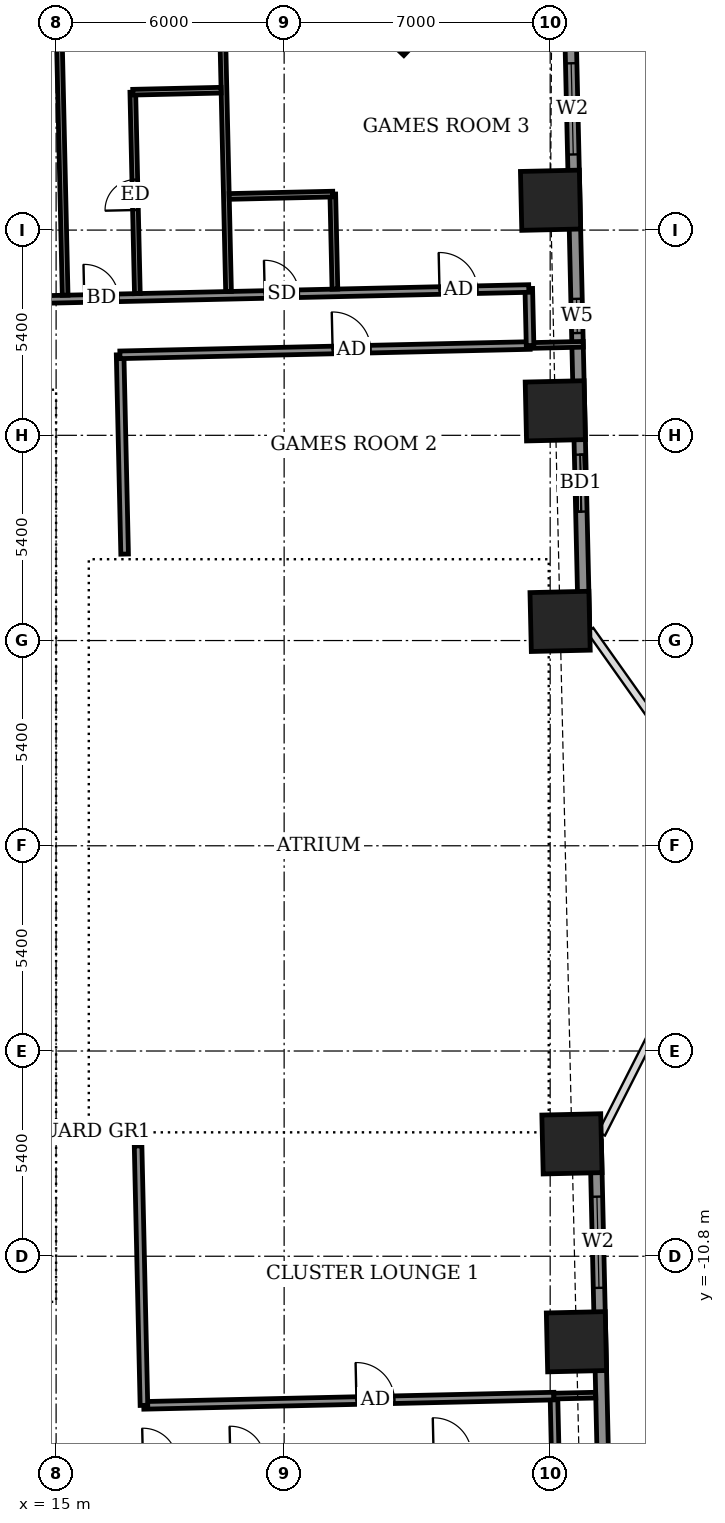
"""IFC4 building model, lengths in metres.
Left out: names, types, materials, properties, quantities, classifications, styles, units other than length and angle.
Written with IfcOpenShell. Run it as: python <this file> out.ifc"""

import sys

from ifc_helpers import new_model, si_unit, direction, frame, frame_2d, origin, origin_2d, place, context, subcontext, project, spatial, rectangle, extrude, element, fill, save


model = new_model("IFC4")
c1 = context("Model", 3, precision=1e-05, world=origin(), true_north=direction((0.0, 1.0)))
c2 = subcontext(c1, "Body", "Model", "MODEL_VIEW")
j1 = project(units=[si_unit("LENGTHUNIT", "METRE"), si_unit("PLANEANGLEUNIT", "RADIAN")], contexts=[c1])
p1 = place(None, origin())
s1 = spatial("IfcSite", under=j1, at=p1, CompositionType="ELEMENT")
p2 = place(p1, origin())
s2 = spatial("IfcBuilding", under=s1, at=p2, CompositionType="ELEMENT")
p3 = place(p2, frame((0.0, 0.0, 34.1)))
s3 = spatial("IfcBuildingStorey", under=s2, at=p3, CompositionType="ELEMENT", Elevation=34.1)
for number, where, z_axis, x_axis in (
    (1, (28.691, -13.05, -0.55), (0.0, 0.0, 1.0), (-0.023, 1.0, 0.0)),
    (2, (28.573, -7.843, -0.55), (0.0, 0.0, 1.0), (-0.023, 1.0, 0.0)),
    (3, (28.261, 5.904, -0.55), (0.0, 0.0, 1.0), (-0.023, 1.0, 0.0)),
    (4, (28.135, 11.444, -0.55), (0.0, 0.0, 1.0), (-0.023, 1.0, 0.0)),
    (5, (28.01, 16.985, -0.55), (0.0, 0.0, 1.0), (-0.023, 1.0, 0.0)),
    (6, (24.125, 21.892, -0.55), (0.0, 0.0, 1.0), (-0.723, 0.691, 0.0)),
):
    element("IfcColumn", number, at=place(p3, frame(where, z_axis=z_axis, x_axis=x_axis)), inside=s3, PredefinedType="COLUMN", context=c2, shape_type="SweptSolid", body=[
        extrude(rectangle(XDim=1.55, YDim=1.55, at=origin_2d()), origin(), (0.0, 0.0, 1.0), 3.6),
    ])
p4 = place(p3, frame((29.549, -23.299, 0.0), z_axis=(0.0, 0.0, 1.0), x_axis=(-0.022670336976, 0.999742994885, 0.0)))
e7 = element("IfcWall", 7, at=p4, inside=s3, PredefinedType="SOLIDWALL", context=c2, shape_type="SweptSolid", body=[
    extrude(rectangle(XDim=15.529, YDim=0.3, at=frame_2d((7.765, 0.0))), origin(), (0.0, 0.0, 1.0), 3.05),
])
p5 = place(p4, frame((2.133, 0.0, 0.0)))
e8 = element("IfcOpeningElement", 8, at=p5, cuts=e7, PredefinedType="OPENING", context=c2, shape_type="SweptSolid", body=[
    extrude(rectangle(XDim=1.5, YDim=2.4, at=frame_2d((0.75, 1.2))), frame((0.0, 0.16, 0.0), z_axis=(0.0, -1.0, 0.0), x_axis=(1.0, 0.0, 0.0)), (0.0, 0.0, 1.0), 0.32),
])
p6 = place(p4, frame((11.67, 0.0, 0.9)))
e9 = element("IfcOpeningElement", 9, at=p6, cuts=e7, PredefinedType="OPENING", context=c2, shape_type="SweptSolid", body=[
    extrude(rectangle(XDim=2.4, YDim=1.5, at=frame_2d((1.2, 0.75))), frame((0.0, 0.16, 0.0), z_axis=(0.0, -1.0, 0.0), x_axis=(1.0, 0.0, 0.0)), (0.0, 0.0, 1.0), 0.32),
])
p7 = place(p3, frame((28.887, 5.864, 0.0), z_axis=(0.0, 0.0, 1.0), x_axis=(-0.022687182773, 0.999742612745, 0.0)))
e10 = element("IfcWall", 10, at=p7, inside=s3, PredefinedType="SOLIDWALL", context=c2, shape_type="SweptSolid", body=[
    extrude(rectangle(XDim=16.529, YDim=0.3, at=frame_2d((8.265, 0.0))), origin(), (0.0, 0.0, 1.0), 3.05),
])
p8 = place(p7, frame((2.929, 0.0, 0.0)))
e11 = element("IfcOpeningElement", 11, at=p8, cuts=e10, PredefinedType="OPENING", context=c2, shape_type="SweptSolid", body=[
    extrude(rectangle(XDim=1.5, YDim=2.4, at=frame_2d((0.75, 1.2))), frame((0.0, 0.16, 0.0), z_axis=(0.0, -1.0, 0.0), x_axis=(1.0, 0.0, 0.0)), (0.0, 0.0, 1.0), 0.32),
])
p9 = place(p7, frame((7.629, 0.0, 0.9)))
e12 = element("IfcOpeningElement", 12, at=p9, cuts=e10, PredefinedType="OPENING", context=c2, shape_type="SweptSolid", body=[
    extrude(rectangle(XDim=0.9, YDim=1.5, at=frame_2d((0.45, 0.75))), frame((0.0, 0.16, 0.0), z_axis=(0.0, -1.0, 0.0), x_axis=(1.0, 0.0, 0.0)), (0.0, 0.0, 1.0), 0.32),
])
p10 = place(p7, frame((12.329, 0.0, 0.9)))
e13 = element("IfcOpeningElement", 13, at=p10, cuts=e10, PredefinedType="OPENING", context=c2, shape_type="SweptSolid", body=[
    extrude(rectangle(XDim=2.4, YDim=1.5, at=frame_2d((1.2, 0.75))), frame((0.0, 0.16, 0.0), z_axis=(0.0, -1.0, 0.0), x_axis=(1.0, 0.0, 0.0)), (0.0, 0.0, 1.0), 0.32),
])
p11 = place(p3, frame((30.832, -15.918, 0.0), z_axis=(0.0, 0.0, 1.0), x_axis=(-0.022828630714, 0.999739392852, 0.0)))
e14 = element("IfcWall", 14, at=p11, inside=s3, PredefinedType="USERDEFINED", context=c2, shape_type="SweptSolid", body=[
    extrude(rectangle(XDim=6.0, YDim=0.55, at=frame_2d((3.0, 0.0))), origin(), (0.0, 0.0, 1.0), 0.8),
])
p12 = place(p3, frame((30.33, 6.201, 0.0), z_axis=(0.0, 0.0, 1.0), x_axis=(-0.022744303924, 0.999741314861, 0.0)))
e15 = element("IfcWall", 15, at=p12, inside=s3, PredefinedType="USERDEFINED", context=c2, shape_type="SweptSolid", body=[
    extrude(rectangle(XDim=3.875, YDim=0.55, at=frame_2d((1.938, 0.0))), origin(), (0.0, 0.0, 1.0), 0.8),
])
p13 = place(p3, frame((28.133, -15.979, 0.0), z_axis=(0.0, 0.0, 1.0), x_axis=(-0.022632637625, 0.99974384905, 0.0)))
e16 = element("IfcWall", 16, at=p13, inside=s3, PredefinedType="PARTITIONING", context=c2, shape_type="SweptSolid", body=[
    extrude(rectangle(XDim=1.5, YDim=0.2, at=frame_2d((0.75, 0.0))), origin(), (0.0, 0.0, 1.0), 3.05),
])
p14 = place(p3, frame((17.306, -14.724, 0.0), z_axis=(0.0, 0.0, 1.0), x_axis=(0.999744269809, 0.022614043969, 0.0)))
e17 = element("IfcWall", 17, at=p14, inside=s3, PredefinedType="PARTITIONING", context=c2, shape_type="SweptSolid", body=[
    extrude(rectangle(XDim=10.796, YDim=0.2, at=frame_2d((5.398, 0.0))), origin(), (0.0, 0.0, 1.0), 3.05),
])
p15 = place(p14, frame((5.598, 0.0, 0.0)))
e18 = element("IfcOpeningElement", 18, at=p15, cuts=e17, PredefinedType="OPENING", context=c2, shape_type="SweptSolid", body=[
    extrude(rectangle(XDim=1.0, YDim=2.1, at=frame_2d((0.5, 1.05))), frame((0.0, 0.11, 0.0), z_axis=(0.0, -1.0, 0.0), x_axis=(1.0, 0.0, 0.0)), (0.0, 0.0, 1.0), 0.22),
])
p16 = place(p3, frame((17.311, -14.724, 0.0), z_axis=(0.0, 0.0, 1.0), x_axis=(-0.022562209343, 0.999745440955, 0.0)))
e19 = element("IfcWall", 19, at=p16, inside=s3, PredefinedType="PARTITIONING", context=c2, shape_type="SweptSolid", body=[
    extrude(rectangle(XDim=6.828, YDim=0.2, at=frame_2d((3.414, 0.0))), origin(), (0.0, 0.0, 1.0), 3.05),
])
p17 = place(p3, frame((28.095, -14.48, 0.0), z_axis=(0.0, 0.0, 1.0), x_axis=(0.999745251335, 0.022570609924, 0.0)))
e20 = element("IfcWall", 20, at=p17, inside=s3, PredefinedType="PARTITIONING", context=c2, shape_type="SweptSolid", body=[
    extrude(rectangle(XDim=1.103, YDim=0.15, at=frame_2d((0.552, 0.0))), origin(), (0.0, 0.0, 1.0), 2.55),
])
p18 = place(p3, frame((16.803, 7.675, 0.0), z_axis=(0.0, 0.0, 1.0), x_axis=(-0.022667483124, 0.999743059595, 0.0)))
e21 = element("IfcWall", 21, at=p18, inside=s3, PredefinedType="PARTITIONING", context=c2, shape_type="SweptSolid", body=[
    extrude(rectangle(XDim=5.245, YDim=0.2, at=frame_2d((2.623, 0.0))), origin(), (0.0, 0.0, 1.0), 3.05),
])
p19 = place(p3, frame((16.679, 12.918, 0.0), z_axis=(0.0, 0.0, 1.0), x_axis=(0.999742162372, 0.022707020428, 0.0)))
e22 = element("IfcWall", 22, at=p19, inside=s3, PredefinedType="PARTITIONING", context=c2, shape_type="SweptSolid", body=[
    extrude(rectangle(XDim=10.795, YDim=0.2, at=frame_2d((5.397, 0.0))), origin(), (0.0, 0.0, 1.0), 3.05),
])
p20 = place(p19, frame((5.598, 0.0, 0.0)))
e23 = element("IfcOpeningElement", 23, at=p20, cuts=e22, PredefinedType="OPENING", context=c2, shape_type="SweptSolid", body=[
    extrude(rectangle(XDim=1.0, YDim=2.1, at=frame_2d((0.5, 1.05))), frame((0.0, 0.11, 0.0), z_axis=(0.0, -1.0, 0.0), x_axis=(1.0, 0.0, 0.0)), (0.0, 0.0, 1.0), 0.22),
])
p21 = place(p3, frame((27.471, 13.163, 0.0), z_axis=(0.0, 0.0, 1.0), x_axis=(0.999739219063, 0.022836240226, 0.0)))
e24 = element("IfcWall", 24, at=p21, inside=s3, PredefinedType="PARTITIONING", context=c2, shape_type="SweptSolid", body=[
    extrude(rectangle(XDim=1.4, YDim=0.15, at=frame_2d((0.7, 0.0))), origin(), (0.0, 0.0, 1.0), 2.55),
])
p22 = place(p3, frame((27.471, 13.163, 0.0), z_axis=(0.0, 0.0, 1.0), x_axis=(-0.022617910375, 0.999744182344, 0.0)))
e25 = element("IfcWall", 25, at=p22, inside=s3, PredefinedType="PARTITIONING", context=c2, shape_type="SweptSolid", body=[
    extrude(rectangle(XDim=1.5, YDim=0.2, at=frame_2d((0.75, 0.0))), origin(), (0.0, 0.0, 1.0), 3.05),
])
p23 = place(p3, frame((-31.347, 13.329, 0.0), z_axis=(0.0, 0.0, 1.0), x_axis=(0.999742613079, 0.022687168058, 0.0)))
e26 = element("IfcWall", 26, at=p23, inside=s3, PredefinedType="PARTITIONING", context=c2, shape_type="SweptSolid", body=[
    extrude(rectangle(XDim=58.799, YDim=0.2, at=frame_2d((29.399, 0.0))), origin(), (0.0, 0.0, 1.0), 3.05),
])
p24 = place(p23, frame((56.45, 0.0, 0.0)))
e27 = element("IfcOpeningElement", 27, at=p24, cuts=e26, PredefinedType="OPENING", context=c2, shape_type="SweptSolid", body=[
    extrude(rectangle(XDim=1.0, YDim=2.1, at=frame_2d((0.5, 1.05))), frame((0.0, 0.11, 0.0), z_axis=(0.0, -1.0, 0.0), x_axis=(1.0, 0.0, 0.0)), (0.0, 0.0, 1.0), 0.22),
])
p25 = place(p23, frame((51.85, 0.0, 0.0)))
e28 = element("IfcOpeningElement", 28, at=p25, cuts=e26, PredefinedType="OPENING", context=c2, shape_type="SweptSolid", body=[
    extrude(rectangle(XDim=0.9, YDim=2.1, at=frame_2d((0.45, 1.05))), frame((0.0, 0.11, 0.0), z_axis=(0.0, -1.0, 0.0), x_axis=(1.0, 0.0, 0.0)), (0.0, 0.0, 1.0), 0.22),
])
p26 = place(p23, frame((47.1, 0.0, 0.0)))
e29 = element("IfcOpeningElement", 29, at=p26, cuts=e26, PredefinedType="OPENING", context=c2, shape_type="SweptSolid", body=[
    extrude(rectangle(XDim=0.9, YDim=2.1, at=frame_2d((0.45, 1.05))), frame((0.0, 0.11, 0.0), z_axis=(0.0, -1.0, 0.0), x_axis=(1.0, 0.0, 0.0)), (0.0, 0.0, 1.0), 0.22),
])
p27 = place(p23, frame((45.225, 0.0, 0.0)))
e30 = element("IfcOpeningElement", 30, at=p27, cuts=e26, PredefinedType="OPENING", context=c2, shape_type="SweptSolid", body=[
    extrude(rectangle(XDim=0.9, YDim=2.1, at=frame_2d((0.45, 1.05))), frame((0.0, 0.11, 0.0), z_axis=(0.0, -1.0, 0.0), x_axis=(1.0, 0.0, 0.0)), (0.0, 0.0, 1.0), 0.22),
])
p28 = place(p23, frame((38.55, 0.0, 0.0)))
e31 = element("IfcOpeningElement", 31, at=p28, cuts=e26, PredefinedType="OPENING", context=c2, shape_type="SweptSolid", body=[
    extrude(rectangle(XDim=0.9, YDim=2.1, at=frame_2d((0.45, 1.05))), frame((0.0, 0.11, 0.0), z_axis=(0.0, -1.0, 0.0), x_axis=(1.0, 0.0, 0.0)), (0.0, 0.0, 1.0), 0.22),
])
p29 = place(p23, frame((36.625, 0.0, 0.0)))
e32 = element("IfcOpeningElement", 32, at=p29, cuts=e26, PredefinedType="OPENING", context=c2, shape_type="SweptSolid", body=[
    extrude(rectangle(XDim=0.9, YDim=2.1, at=frame_2d((0.45, 1.05))), frame((0.0, 0.11, 0.0), z_axis=(0.0, -1.0, 0.0), x_axis=(1.0, 0.0, 0.0)), (0.0, 0.0, 1.0), 0.22),
])
p30 = place(p23, frame((29.875, 0.0, 0.0)))
e33 = element("IfcOpeningElement", 33, at=p30, cuts=e26, PredefinedType="OPENING", context=c2, shape_type="SweptSolid", body=[
    extrude(rectangle(XDim=0.9, YDim=2.1, at=frame_2d((0.45, 1.05))), frame((0.0, 0.11, 0.0), z_axis=(0.0, -1.0, 0.0), x_axis=(1.0, 0.0, 0.0)), (0.0, 0.0, 1.0), 0.22),
])
p31 = place(p23, frame((27.9, 0.0, 0.0)))
e34 = element("IfcOpeningElement", 34, at=p31, cuts=e26, PredefinedType="OPENING", context=c2, shape_type="SweptSolid", body=[
    extrude(rectangle(XDim=0.9, YDim=2.1, at=frame_2d((0.45, 1.05))), frame((0.0, 0.11, 0.0), z_axis=(0.0, -1.0, 0.0), x_axis=(1.0, 0.0, 0.0)), (0.0, 0.0, 1.0), 0.22),
])
p32 = place(p23, frame((21.1, 0.0, 0.0)))
e35 = element("IfcOpeningElement", 35, at=p32, cuts=e26, PredefinedType="OPENING", context=c2, shape_type="SweptSolid", body=[
    extrude(rectangle(XDim=0.9, YDim=2.1, at=frame_2d((0.45, 1.05))), frame((0.0, 0.11, 0.0), z_axis=(0.0, -1.0, 0.0), x_axis=(1.0, 0.0, 0.0)), (0.0, 0.0, 1.0), 0.22),
])
p33 = place(p23, frame((19.175, 0.0, 0.0)))
e36 = element("IfcOpeningElement", 36, at=p33, cuts=e26, PredefinedType="OPENING", context=c2, shape_type="SweptSolid", body=[
    extrude(rectangle(XDim=0.9, YDim=2.1, at=frame_2d((0.45, 1.05))), frame((0.0, 0.11, 0.0), z_axis=(0.0, -1.0, 0.0), x_axis=(1.0, 0.0, 0.0)), (0.0, 0.0, 1.0), 0.22),
])
p34 = place(p23, frame((12.5, 0.0, 0.0)))
e37 = element("IfcOpeningElement", 37, at=p34, cuts=e26, PredefinedType="OPENING", context=c2, shape_type="SweptSolid", body=[
    extrude(rectangle(XDim=0.9, YDim=2.1, at=frame_2d((0.45, 1.05))), frame((0.0, 0.11, 0.0), z_axis=(0.0, -1.0, 0.0), x_axis=(1.0, 0.0, 0.0)), (0.0, 0.0, 1.0), 0.22),
])
p35 = place(p23, frame((10.575, 0.0, 0.0)))
e38 = element("IfcOpeningElement", 38, at=p35, cuts=e26, PredefinedType="OPENING", context=c2, shape_type="SweptSolid", body=[
    extrude(rectangle(XDim=0.9, YDim=2.1, at=frame_2d((0.45, 1.05))), frame((0.0, 0.11, 0.0), z_axis=(0.0, -1.0, 0.0), x_axis=(1.0, 0.0, 0.0)), (0.0, 0.0, 1.0), 0.22),
])
p36 = place(p23, frame((1.425, 0.0, 0.0)))
e39 = element("IfcOpeningElement", 39, at=p36, cuts=e26, PredefinedType="OPENING", context=c2, shape_type="SweptSolid", body=[
    extrude(rectangle(XDim=1.0, YDim=2.1, at=frame_2d((0.5, 1.05))), frame((0.0, 0.11, 0.0), z_axis=(0.0, -1.0, 0.0), x_axis=(1.0, 0.0, 0.0)), (0.0, 0.0, 1.0), 0.22),
])
p37 = place(p23, frame((6.0, 0.0, 0.0)))
e40 = element("IfcOpeningElement", 40, at=p37, cuts=e26, PredefinedType="OPENING", context=c2, shape_type="SweptSolid", body=[
    extrude(rectangle(XDim=0.9, YDim=2.1, at=frame_2d((0.45, 1.05))), frame((0.0, 0.11, 0.0), z_axis=(0.0, -1.0, 0.0), x_axis=(1.0, 0.0, 0.0)), (0.0, 0.0, 1.0), 0.22),
])
p38 = place(p3, frame((15.238, 14.486, 0.0), z_axis=(0.0, 0.0, 1.0), x_axis=(-0.022706391805, 0.999742176649, 0.0)))
e41 = element("IfcWall", 41, at=p38, inside=s3, PredefinedType="PARTITIONING", context=c2, shape_type="SweptSolid", body=[
    extrude(rectangle(XDim=11.451, YDim=0.15, at=frame_2d((5.726, 0.0))), origin(), (0.0, 0.0, 1.0), 2.55),
])
p39 = place(p3, frame((17.138, 14.529, 0.0), z_axis=(0.0, 0.0, 1.0), x_axis=(-0.022616771387, 0.999744208111, 0.0)))
e42 = element("IfcWall", 42, at=p39, inside=s3, PredefinedType="PARTITIONING", context=c2, shape_type="SweptSolid", body=[
    extrude(rectangle(XDim=5.3, YDim=0.15, at=frame_2d((2.65, 0.0))), origin(), (0.0, 0.0, 1.0), 3.05),
])
p40 = place(p39, frame((2.2, 0.0, 0.0)))
e43 = element("IfcOpeningElement", 43, at=p40, cuts=e42, PredefinedType="OPENING", context=c2, shape_type="SweptSolid", body=[
    extrude(rectangle(XDim=0.8, YDim=2.1, at=frame_2d((0.4, 1.05))), frame((0.0, 0.085, 0.0), z_axis=(0.0, -1.0, 0.0), x_axis=(1.0, 0.0, 0.0)), (0.0, 0.0, 1.0), 0.17),
])
p41 = place(p3, frame((19.537, 14.584, 0.0), z_axis=(0.0, 0.0, 1.0), x_axis=(-0.022708327922, 0.999742132674, 0.0)))
e44 = element("IfcWall", 44, at=p41, inside=s3, PredefinedType="PARTITIONING", context=c2, shape_type="SweptSolid", body=[
    extrude(rectangle(XDim=11.45, YDim=0.15, at=frame_2d((5.725, 0.0))), origin(), (0.0, 0.0, 1.0), 2.55),
])
p42 = place(p3, frame((22.336, 14.647, 0.0), z_axis=(0.0, 0.0, 1.0), x_axis=(-0.022357691225, 0.99975003558, 0.0)))
e45 = element("IfcWall", 45, at=p42, inside=s3, PredefinedType="PARTITIONING", context=c2, shape_type="SweptSolid", body=[
    extrude(rectangle(XDim=2.501, YDim=0.15, at=frame_2d((1.25, 0.0))), origin(), (0.0, 0.0, 1.0), 3.05),
])
p43 = place(p3, frame((19.555, 17.085, 0.0), z_axis=(0.0, 0.0, 1.0), x_axis=(0.999741187782, 0.022749889061, 0.0)))
e46 = element("IfcWall", 46, at=p43, inside=s3, PredefinedType="PARTITIONING", context=c2, shape_type="SweptSolid", body=[
    extrude(rectangle(XDim=2.726, YDim=0.15, at=frame_2d((1.363, 0.0))), origin(), (0.0, 0.0, 1.0), 3.05),
])
p44 = place(p3, frame((17.018, 19.828, 0.0), z_axis=(0.0, 0.0, 1.0), x_axis=(0.999737862264, 0.022895561926, 0.0)))
e47 = element("IfcWall", 47, at=p44, inside=s3, PredefinedType="PARTITIONING", context=c2, shape_type="SweptSolid", body=[
    extrude(rectangle(XDim=2.324, YDim=0.15, at=frame_2d((1.162, 0.0))), origin(), (0.0, 0.0, 1.0), 3.05),
])
p45 = place(p3, frame((14.35, -10.8, 0.0), z_axis=(0.0, 0.0, 1.0), x_axis=(0.0, 1.0, 0.0)))
e48 = element("IfcWall", 48, at=p45, inside=s3, PredefinedType="SHEAR", context=c2, shape_type="SweptSolid", body=[
    extrude(rectangle(XDim=21.6, YDim=1.1, at=frame_2d((10.8, 0.0))), origin(), (0.0, 0.0, 1.0), 3.6),
])
p46 = place(p45, frame((1.2, 0.0, 0.0)))
e49 = element("IfcOpeningElement", 49, at=p46, cuts=e48, PredefinedType="OPENING", context=c2, shape_type="SweptSolid", body=[
    extrude(rectangle(XDim=1.2, YDim=2.1, at=frame_2d((0.6, 1.05))), frame((0.0, 0.56, 0.0), z_axis=(0.0, -1.0, 0.0), x_axis=(1.0, 0.0, 0.0)), (0.0, 0.0, 1.0), 1.12),
])
p47 = place(p6, origin())
e50 = element("IfcWindow", 50, at=p47, inside=s3, PartitioningType="DOUBLE_PANEL_VERTICAL", PredefinedType="WINDOW", context=c2, shape_type="SweptSolid", body=[
    extrude(rectangle(XDim=2.4, YDim=1.5, at=frame_2d((1.2, 0.75))), frame((0.0, 0.03, 0.0), z_axis=(0.0, -1.0, 0.0), x_axis=(1.0, 0.0, 0.0)), (0.0, 0.0, 1.0), 0.06),
])
fill(e9, e50)
p48 = place(p8, origin())
e51 = element("IfcDoor", 51, at=p48, inside=s3, OperationType="SLIDING_TO_LEFT", PredefinedType="DOOR", context=c2, shape_type="SweptSolid", body=[
    extrude(rectangle(XDim=1.5, YDim=2.4, at=frame_2d((0.75, 1.2))), frame((0.0, 0.025, 0.0), z_axis=(0.0, -1.0, 0.0), x_axis=(1.0, 0.0, 0.0)), (0.0, 0.0, 1.0), 0.05),
])
fill(e11, e51)
p49 = place(p9, origin())
e52 = element("IfcWindow", 52, at=p49, inside=s3, PartitioningType="SINGLE_PANEL", PredefinedType="WINDOW", context=c2, shape_type="SweptSolid", body=[
    extrude(rectangle(XDim=0.9, YDim=1.5, at=frame_2d((0.45, 0.75))), frame((0.0, 0.03, 0.0), z_axis=(0.0, -1.0, 0.0), x_axis=(1.0, 0.0, 0.0)), (0.0, 0.0, 1.0), 0.06),
])
fill(e12, e52)
p50 = place(p10, origin())
e53 = element("IfcWindow", 53, at=p50, inside=s3, PartitioningType="DOUBLE_PANEL_VERTICAL", PredefinedType="WINDOW", context=c2, shape_type="SweptSolid", body=[
    extrude(rectangle(XDim=2.4, YDim=1.5, at=frame_2d((1.2, 0.75))), frame((0.0, 0.03, 0.0), z_axis=(0.0, -1.0, 0.0), x_axis=(1.0, 0.0, 0.0)), (0.0, 0.0, 1.0), 0.06),
])
fill(e13, e53)
p51 = place(p15, origin())
e54 = element("IfcDoor", 54, at=p51, inside=s3, OperationType="SINGLE_SWING_LEFT", PredefinedType="DOOR", context=c2, shape_type="SweptSolid", body=[
    extrude(rectangle(XDim=1.0, YDim=2.1, at=frame_2d((0.5, 1.05))), frame((0.0, 0.025, 0.0), z_axis=(0.0, -1.0, 0.0), x_axis=(1.0, 0.0, 0.0)), (0.0, 0.0, 1.0), 0.05),
])
fill(e18, e54)
p52 = place(p20, origin())
e55 = element("IfcDoor", 55, at=p52, inside=s3, OperationType="SINGLE_SWING_RIGHT", PredefinedType="DOOR", context=c2, shape_type="SweptSolid", body=[
    extrude(rectangle(XDim=1.0, YDim=2.1, at=frame_2d((0.5, 1.05))), frame((0.0, 0.025, 0.0), z_axis=(0.0, -1.0, 0.0), x_axis=(1.0, 0.0, 0.0)), (0.0, 0.0, 1.0), 0.05),
])
fill(e23, e55)
p53 = place(p24, origin())
e56 = element("IfcDoor", 56, at=p53, inside=s3, OperationType="SINGLE_SWING_LEFT", PredefinedType="DOOR", context=c2, shape_type="SweptSolid", body=[
    extrude(rectangle(XDim=1.0, YDim=2.1, at=frame_2d((0.5, 1.05))), frame((0.0, 0.025, 0.0), z_axis=(0.0, -1.0, 0.0), x_axis=(1.0, 0.0, 0.0)), (0.0, 0.0, 1.0), 0.05),
])
fill(e27, e56)
p54 = place(p25, origin())
e57 = element("IfcDoor", 57, at=p54, inside=s3, OperationType="SINGLE_SWING_RIGHT", PredefinedType="DOOR", context=c2, shape_type="SweptSolid", body=[
    extrude(rectangle(XDim=0.9, YDim=2.1, at=frame_2d((0.45, 1.05))), frame((0.0, 0.025, 0.0), z_axis=(0.0, -1.0, 0.0), x_axis=(1.0, 0.0, 0.0)), (0.0, 0.0, 1.0), 0.05),
])
fill(e28, e57)
p55 = place(p26, origin())
e58 = element("IfcDoor", 58, at=p55, inside=s3, OperationType="SINGLE_SWING_RIGHT", PredefinedType="DOOR", context=c2, shape_type="SweptSolid", body=[
    extrude(rectangle(XDim=0.9, YDim=2.1, at=frame_2d((0.45, 1.05))), frame((0.0, 0.025, 0.0), z_axis=(0.0, -1.0, 0.0), x_axis=(1.0, 0.0, 0.0)), (0.0, 0.0, 1.0), 0.05),
])
fill(e29, e58)
p56 = place(p40, origin())
e59 = element("IfcDoor", 59, at=p56, inside=s3, OperationType="SINGLE_SWING_RIGHT", PredefinedType="DOOR", context=c2, shape_type="SweptSolid", body=[
    extrude(rectangle(XDim=0.8, YDim=2.1, at=frame_2d((0.4, 1.05))), frame((0.0, 0.025, 0.0), z_axis=(0.0, -1.0, 0.0), x_axis=(1.0, 0.0, 0.0)), (0.0, 0.0, 1.0), 0.05),
])
fill(e43, e59)
save(model, sys.argv[1])
